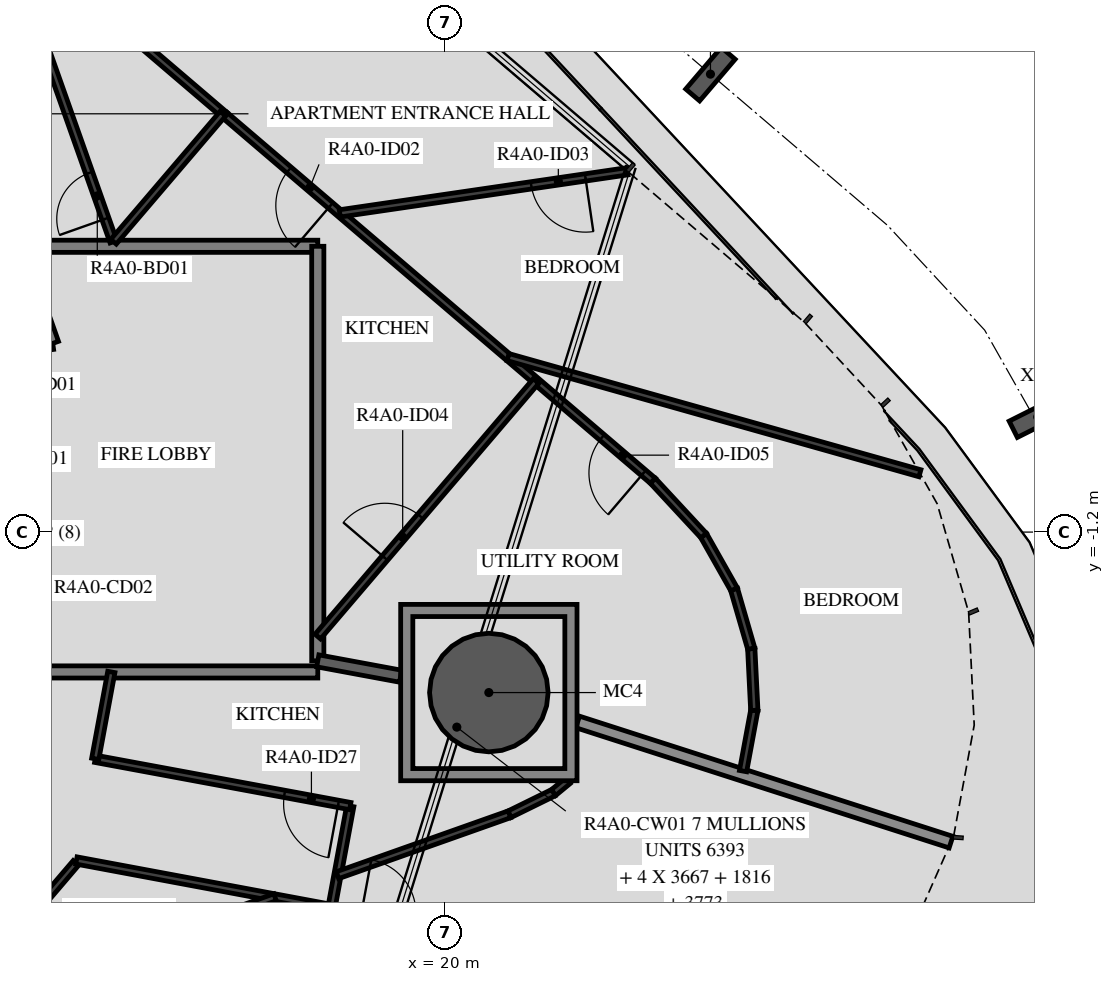
"""IFC4 building model, lengths in metres.
Left out: names, types, materials, properties, quantities, classifications, styles, units other than length and angle.
Written with IfcOpenShell. Run it as: python <this file> out.ifc"""

import sys

from ifc_helpers import new_model, si_unit, direction, frame, frame_2d, origin, origin_2d, place, context, subcontext, project, spatial, polyline, rectangle, hollow_circle, i_section, outline, extrude, element, fill, save


model = new_model("IFC4")
c1 = context("Model", 3, precision=1e-05, world=origin(), true_north=direction((0.0, 1.0)))
c2 = subcontext(c1, "Body", "Model", "MODEL_VIEW")
j1 = project(units=[si_unit("LENGTHUNIT", "METRE"), si_unit("PLANEANGLEUNIT", "RADIAN")], contexts=[c1])
p1 = place(None, origin())
s1 = spatial("IfcSite", under=j1, at=p1, CompositionType="ELEMENT")
p2 = place(p1, origin())
s2 = spatial("IfcBuilding", under=s1, at=p2, CompositionType="ELEMENT")
p3 = place(p2, frame((0.0, 0.0, 151.7)))
s3 = spatial("IfcBuildingStorey", under=s2, at=p3, CompositionType="ELEMENT", Elevation=151.7)
p4 = place(p3, frame((20.713, -3.839, -0.45), z_axis=(0.0, 0.0, 1.0), x_axis=(1.0, 0.0, 0.0)))
e1 = element("IfcColumn", 1, at=p4, inside=s3, PredefinedType="COLUMN", context=c2, shape_type="SweptSolid", body=[
    extrude(hollow_circle(Radius=0.975, WallThickness=0.045, at=origin_2d()), origin(), (0.0, 0.0, 1.0), 3.57),
])
for number, where, z_axis, x_axis in (
    (2, (29.74, 0.692, -0.45), (0.0, 0.0, 1.0), (0.449, -0.894, 0.0)),
    (3, (24.358, 6.331, -0.45), (0.0, 0.0, 1.0), (0.76, -0.649, 0.0)),
):
    element("IfcColumn", number, at=place(p3, frame(where, z_axis=z_axis, x_axis=x_axis)), inside=s3, PredefinedType="COLUMN", context=c2, shape_type="SweptSolid", body=[
        extrude(i_section(OverallWidth=0.3, OverallDepth=0.9, WebThickness=0.019, FlangeThickness=0.035, FilletRadius=0.03, at=origin_2d()), origin(), (0.0, 0.0, 1.0), 3.57),
    ])
p5 = place(p3, frame((11.87, 1.668, 0.0), z_axis=(0.0, 0.0, 1.0), x_axis=(0.990270910415, 0.139152879904, 0.0)))
e4 = element("IfcWall", 4, at=p5, inside=s3, PredefinedType="STANDARD", context=c2, shape_type="SweptSolid", body=[
    extrude(rectangle(XDim=1.688, YDim=0.2, at=frame_2d((0.844, 0.0))), origin(), (0.0, 0.0, 1.0), 3.12),
])
p6 = place(p5, frame((0.11, 0.0, 0.0)))
e5 = element("IfcOpeningElement", 5, at=p6, cuts=e4, PredefinedType="OPENING", context=c2, shape_type="SweptSolid", body=[
    extrude(rectangle(XDim=1.2, YDim=2.1, at=frame_2d((0.6, 1.05))), frame((0.0, 0.11, 0.0), z_axis=(0.0, -1.0, 0.0), x_axis=(1.0, 0.0, 0.0)), (0.0, 0.0, 1.0), 0.22),
])
p7 = place(p3, frame((13.542, 1.903, 0.0), z_axis=(0.0, 0.0, 1.0), x_axis=(-0.333808508206, 0.942640907159, 0.0)))
e6 = element("IfcWall", 6, at=p7, inside=s3, PredefinedType="STANDARD", context=c2, shape_type="SweptSolid", body=[
    extrude(rectangle(XDim=6.317, YDim=0.2, at=frame_2d((3.158, 0.0))), origin(), (0.0, 0.0, 1.0), 3.12),
])
p8 = place(p3, frame((17.9, 3.5, 0.0), z_axis=(0.0, 0.0, 1.0), x_axis=(-1.0, 0.0, 0.0)))
e7 = element("IfcWall", 7, at=p8, inside=s3, PredefinedType="STANDARD", context=c2, shape_type="SweptSolid", body=[
    extrude(rectangle(XDim=4.924, YDim=0.2, at=frame_2d((2.462, 0.0))), origin(), (0.0, 0.0, 1.0), 3.12),
])
p9 = place(p3, frame((17.9, -3.318, 0.0), z_axis=(0.0, 0.0, 1.0), x_axis=(0.0, 1.0, 0.0)))
e8 = element("IfcWall", 8, at=p9, inside=s3, PredefinedType="STANDARD", context=c2, shape_type="SweptSolid", body=[
    extrude(rectangle(XDim=6.818, YDim=0.2, at=frame_2d((3.409, 0.0))), origin(), (0.0, 0.0, 1.0), 3.12),
])
p10 = place(p3, frame((12.979, -3.5, 0.0), z_axis=(0.0, 0.0, 1.0), x_axis=(1.0, 0.0, 0.0)))
e9 = element("IfcWall", 9, at=p10, inside=s3, PredefinedType="STANDARD", context=c2, shape_type="SweptSolid", body=[
    extrude(rectangle(XDim=4.92, YDim=0.2, at=frame_2d((2.46, 0.0))), origin(), (0.0, 0.0, 1.0), 3.12),
])
p11 = place(p3, frame((22.173, -4.322, 0.0), z_axis=(0.0, 0.0, 1.0), x_axis=(0.951906405572, -0.306388960362, 0.0)))
e10 = element("IfcWall", 10, at=p11, inside=s3, PredefinedType="STANDARD", context=c2, shape_type="SweptSolid", body=[
    extrude(rectangle(XDim=6.45, YDim=0.2, at=frame_2d((3.225, 0.0))), origin(), (0.0, 0.0, 1.0), 2.73),
])
p12 = place(p3, frame((17.9, -3.318, 0.0), z_axis=(0.0, 0.0, 1.0), x_axis=(0.983252800712, -0.182246892682, 0.0)))
e11 = element("IfcWall", 11, at=p12, inside=s3, PredefinedType="STANDARD", context=c2, shape_type="SweptSolid", body=[
    extrude(rectangle(XDim=1.386, YDim=0.2, at=frame_2d((0.693, 0.0))), origin(), (0.0, 0.0, 1.0), 3.12),
])
p13 = place(p3, frame((14.541, 3.575, 0.0), z_axis=(0.0, 0.0, 1.0), x_axis=(-0.333799280318, 0.942644174893, 0.0)))
e12 = element("IfcWall", 12, at=p13, inside=s3, PredefinedType="PARTITIONING", context=c2, shape_type="SweptSolid", body=[
    extrude(rectangle(XDim=5.477, YDim=0.12, at=frame_2d((2.738, 0.0))), origin(), (0.0, 0.0, 1.0), 3.12),
])
p14 = place(p13, frame((0.4, 0.0, 0.0)))
e13 = element("IfcOpeningElement", 13, at=p14, cuts=e12, PredefinedType="OPENING", context=c2, shape_type="SweptSolid", body=[
    extrude(rectangle(XDim=0.8, YDim=2.1, at=frame_2d((0.4, 1.05))), frame((0.0, 0.07, 0.0), z_axis=(0.0, -1.0, 0.0), x_axis=(1.0, 0.0, 0.0)), (0.0, 0.0, 1.0), 0.14),
])
p15 = place(p3, frame((12.734, 8.762, 0.0), z_axis=(0.0, 0.0, 1.0), x_axis=(0.760390484255, -0.649466174219, 0.0)))
e14 = element("IfcWall", 14, at=p15, inside=s3, PredefinedType="PARTITIONING", context=c2, shape_type="SweptSolid", body=[
    extrude(rectangle(XDim=4.783, YDim=0.12, at=frame_2d((2.391, 0.0))), origin(), (0.0, 0.0, 1.0), 3.12),
])
p16 = place(p3, frame((23.411, -0.357, 0.0), z_axis=(0.0, 0.0, 1.0), x_axis=(-0.76041871148, 0.649433124525, 0.0)))
e15 = element("IfcWall", 15, at=p16, inside=s3, PredefinedType="PARTITIONING", context=c2, shape_type="SweptSolid", body=[
    extrude(rectangle(XDim=9.259, YDim=0.12, at=frame_2d((4.629, 0.0))), origin(), (0.0, 0.0, 1.0), 3.12),
])
p17 = place(p16, frame((6.972, 0.0, 0.0)))
e16 = element("IfcOpeningElement", 16, at=p17, cuts=e15, PredefinedType="OPENING", context=c2, shape_type="SweptSolid", body=[
    extrude(rectangle(XDim=0.9, YDim=2.1, at=frame_2d((0.45, 1.05))), frame((0.0, 0.07, 0.0), z_axis=(0.0, -1.0, 0.0), x_axis=(1.0, 0.0, 0.0)), (0.0, 0.0, 1.0), 0.14),
])
p18 = place(p16, frame((0.2, 0.0, 0.0)))
e17 = element("IfcOpeningElement", 17, at=p18, cuts=e15, PredefinedType="OPENING", context=c2, shape_type="SweptSolid", body=[
    extrude(rectangle(XDim=0.9, YDim=2.1, at=frame_2d((0.45, 1.05))), frame((0.0, 0.07, 0.0), z_axis=(0.0, -1.0, 0.0), x_axis=(1.0, 0.0, 0.0)), (0.0, 0.0, 1.0), 0.14),
])
p19 = place(p3, frame((16.341, 5.682, 0.0), z_axis=(0.0, 0.0, 1.0), x_axis=(-0.64946993237, -0.76038727432, 0.0)))
e18 = element("IfcWall", 18, at=p19, inside=s3, PredefinedType="PARTITIONING", context=c2, shape_type="SweptSolid", body=[
    extrude(rectangle(XDim=2.771, YDim=0.12, at=frame_2d((1.386, 0.0))), origin(), (0.0, 0.0, 1.0), 3.12),
])
p20 = place(p3, frame((17.9, -2.918, 0.0), z_axis=(0.0, 0.0, 1.0), x_axis=(0.649469887983, 0.760387312232, 0.0)))
e19 = element("IfcWall", 19, at=p20, inside=s3, PredefinedType="PARTITIONING", context=c2, shape_type="SweptSolid", body=[
    extrude(rectangle(XDim=5.527, YDim=0.12, at=frame_2d((2.763, 0.0))), origin(), (0.0, 0.0, 1.0), 3.12),
])
p21 = place(p20, frame((1.7, 0.0, 0.0)))
e20 = element("IfcOpeningElement", 20, at=p21, cuts=e19, PredefinedType="OPENING", context=c2, shape_type="SweptSolid", body=[
    extrude(rectangle(XDim=0.9, YDim=2.1, at=frame_2d((0.45, 1.05))), frame((0.0, 0.07, 0.0), z_axis=(0.0, -1.0, 0.0), x_axis=(1.0, 0.0, 0.0)), (0.0, 0.0, 1.0), 0.14),
])
p22 = place(p3, frame((22.994, 4.734, 0.0), z_axis=(0.0, 0.0, 1.0), x_axis=(-0.989449286977, -0.144879634529, 0.0)))
e21 = element("IfcWall", 21, at=p22, inside=s3, PredefinedType="PARTITIONING", context=c2, shape_type="SweptSolid", body=[
    extrude(rectangle(XDim=4.782, YDim=0.12, at=frame_2d((2.391, 0.0))), origin(), (0.0, 0.0, 1.0), 3.12),
])
p23 = place(p22, frame((0.7, 0.0, 0.0)))
e22 = element("IfcOpeningElement", 22, at=p23, cuts=e21, PredefinedType="OPENING", context=c2, shape_type="SweptSolid", body=[
    extrude(rectangle(XDim=0.9, YDim=2.1, at=frame_2d((0.45, 1.05))), frame((0.0, 0.07, 0.0), z_axis=(0.0, -1.0, 0.0), x_axis=(1.0, 0.0, 0.0)), (0.0, 0.0, 1.0), 0.14),
])
p24 = place(p3, frame((21.029, 1.677, 0.0), z_axis=(0.0, 0.0, 1.0), x_axis=(0.962458274539, -0.271429677396, 0.0)))
e23 = element("IfcWall", 23, at=p24, inside=s3, PredefinedType="PARTITIONING", context=c2, shape_type="SweptSolid", body=[
    extrude(rectangle(XDim=7.037, YDim=0.12, at=frame_2d((3.519, 0.0))), origin(), (0.0, 0.0, 1.0), 3.12),
])
for number, where, z_axis, x_axis in (
    (24, (24.894, -5.131, 0.0), (0.0, 0.0, 1.0), (0.182, 0.983, 0.0)),
    (25, (25.079, -4.132, 0.0), (0.0, 0.0, 1.0), (-0.049, 0.999, 0.0)),
):
    element("IfcWall", number, at=place(p3, frame(where, z_axis=z_axis, x_axis=x_axis)), inside=s3, PredefinedType="PARTITIONING", context=c2, shape_type="SweptSolid", body=[
        extrude(rectangle(XDim=1.016, YDim=0.12, at=frame_2d((0.508, 0.0))), origin(), (0.0, 0.0, 1.0), 3.12),
    ])
for number, where, z_axis, x_axis in (
    (26, (25.029, -3.117, 0.0), (0.0, 0.0, 1.0), (-0.279, 0.96, 0.0)),
    (27, (24.746, -2.141, 0.0), (0.0, 0.0, 1.0), (-0.492, 0.87, 0.0)),
):
    element("IfcWall", number, at=place(p3, frame(where, z_axis=z_axis, x_axis=x_axis)), inside=s3, PredefinedType="PARTITIONING", context=c2, shape_type="SweptSolid", body=[
        extrude(rectangle(XDim=1.016, YDim=0.12, at=frame_2d((0.508, 0.0))), origin(), (0.0, 0.0, 1.0), 3.12),
    ])
p25 = place(p3, frame((24.246, -1.257, 0.0), z_axis=(0.0, 0.0, 1.0), x_axis=(-0.679840361176, 0.733360132074, 0.0)))
e28 = element("IfcWall", 28, at=p25, inside=s3, PredefinedType="PARTITIONING", context=c2, shape_type="SweptSolid", body=[
    extrude(rectangle(XDim=1.227, YDim=0.12, at=frame_2d((0.614, 0.0))), origin(), (0.0, 0.0, 1.0), 3.12),
])
p26 = place(p3, frame((8.737, -12.713, 0.0), z_axis=(0.0, 0.0, 1.0), x_axis=(0.649430604754, 0.760420863476, 0.0)))
e29 = element("IfcWall", 29, at=p26, inside=s3, PredefinedType="PARTITIONING", context=c2, shape_type="SweptSolid", body=[
    extrude(rectangle(XDim=7.985, YDim=0.12, at=frame_2d((3.992, 0.0))), origin(), (0.0, 0.0, 1.0), 3.12),
])
p27 = place(p26, frame((0.2, 0.0, 0.0)))
e30 = element("IfcOpeningElement", 30, at=p27, cuts=e29, PredefinedType="OPENING", context=c2, shape_type="SweptSolid", body=[
    extrude(rectangle(XDim=0.9, YDim=2.1, at=frame_2d((0.45, 1.05))), frame((0.0, 0.07, 0.0), z_axis=(0.0, -1.0, 0.0), x_axis=(1.0, 0.0, 0.0)), (0.0, 0.0, 1.0), 0.14),
])
p28 = place(p26, frame((6.234, 0.0, 0.0)))
e31 = element("IfcOpeningElement", 31, at=p28, cuts=e29, PredefinedType="OPENING", context=c2, shape_type="SweptSolid", body=[
    extrude(rectangle(XDim=0.8, YDim=2.1, at=frame_2d((0.4, 1.05))), frame((0.0, 0.07, 0.0), z_axis=(0.0, -1.0, 0.0), x_axis=(1.0, 0.0, 0.0)), (0.0, 0.0, 1.0), 0.14),
])
p29 = place(p3, frame((13.93, -6.6, 0.0), z_axis=(0.0, 0.0, 1.0), x_axis=(0.983034896283, -0.183418626887, 0.0)))
e32 = element("IfcWall", 32, at=p29, inside=s3, PredefinedType="PARTITIONING", context=c2, shape_type="SweptSolid", body=[
    extrude(rectangle(XDim=13.066, YDim=0.12, at=frame_2d((6.533, 0.0))), origin(), (0.0, 0.0, 1.0), 3.12),
])
p30 = place(p29, frame((4.766, 0.0, 0.0)))
e33 = element("IfcOpeningElement", 33, at=p30, cuts=e32, PredefinedType="OPENING", context=c2, shape_type="SweptSolid", body=[
    extrude(rectangle(XDim=0.9, YDim=2.1, at=frame_2d((0.45, 1.05))), frame((0.0, 0.07, 0.0), z_axis=(0.0, -1.0, 0.0), x_axis=(1.0, 0.0, 0.0)), (0.0, 0.0, 1.0), 0.14),
])
p31 = place(p3, frame((18.125, -7.377, 0.0), z_axis=(0.0, 0.0, 1.0), x_axis=(0.182233242958, 0.983255330604, 0.0)))
e34 = element("IfcWall", 34, at=p31, inside=s3, PredefinedType="PARTITIONING", context=c2, shape_type="SweptSolid", body=[
    extrude(rectangle(XDim=1.7, YDim=0.12, at=frame_2d((0.85, 0.0))), origin(), (0.0, 0.0, 1.0), 3.12),
])
p32 = place(p3, frame((18.435, -5.706, 0.0), z_axis=(0.0, 0.0, 1.0), x_axis=(-0.983256187302, 0.18222862051, 0.0)))
e35 = element("IfcWall", 35, at=p32, inside=s3, PredefinedType="PARTITIONING", context=c2, shape_type="SweptSolid", body=[
    extrude(rectangle(XDim=4.266, YDim=0.12, at=frame_2d((2.133, 0.0))), origin(), (0.0, 0.0, 1.0), 3.12),
])
p33 = place(p32, frame((0.2, 0.0, 0.0)))
e36 = element("IfcOpeningElement", 36, at=p33, cuts=e35, PredefinedType="OPENING", context=c2, shape_type="SweptSolid", body=[
    extrude(rectangle(XDim=0.9, YDim=2.1, at=frame_2d((0.45, 1.05))), frame((0.0, 0.07, 0.0), z_axis=(0.0, -1.0, 0.0), x_axis=(1.0, 0.0, 0.0)), (0.0, 0.0, 1.0), 0.14),
])
p34 = place(p3, frame((14.24, -4.928, 0.0), z_axis=(0.0, 0.0, 1.0), x_axis=(0.182329957282, 0.983237400976, 0.0)))
e37 = element("IfcWall", 37, at=p34, inside=s3, PredefinedType="PARTITIONING", context=c2, shape_type="SweptSolid", body=[
    extrude(rectangle(XDim=1.453, YDim=0.12, at=frame_2d((0.727, 0.0))), origin(), (0.0, 0.0, 1.0), 3.12),
])
p35 = place(p3, frame((17.198, -7.206, 0.0), z_axis=(0.0, 0.0, 1.0), x_axis=(-0.942639551003, -0.333812337826, 0.0)))
e38 = element("IfcWall", 38, at=p35, inside=s3, PredefinedType="PARTITIONING", context=c2, shape_type="SweptSolid", body=[
    extrude(rectangle(XDim=5.713, YDim=0.12, at=frame_2d((2.857, 0.0))), origin(), (0.0, 0.0, 1.0), 3.12),
])
p36 = place(p3, frame((22.013, -5.289, 0.0), z_axis=(0.0, 0.0, 1.0), x_axis=(-0.771907381926, -0.635735002755, 0.0)))
e39 = element("IfcWall", 39, at=p36, inside=s3, PredefinedType="PARTITIONING", context=c2, shape_type="SweptSolid", body=[
    extrude(rectangle(XDim=0.308, YDim=0.12, at=frame_2d((0.154, 0.0))), origin(), (0.0, 0.0, 1.0), 3.12),
])
p37 = place(p3, frame((21.775, -5.485, 0.0), z_axis=(0.0, 0.0, 1.0), x_axis=(-0.897493373385, -0.441027940986, 0.0)))
e40 = element("IfcWall", 40, at=p37, inside=s3, PredefinedType="PARTITIONING", context=c2, shape_type="SweptSolid", body=[
    extrude(rectangle(XDim=0.807, YDim=0.12, at=frame_2d((0.403, 0.0))), origin(), (0.0, 0.0, 1.0), 3.12),
])
p38 = place(p3, frame((21.052, -5.841, 0.0), z_axis=(0.0, 0.0, 1.0), x_axis=(-0.94262615799, -0.33385015542, 0.0)))
e41 = element("IfcWall", 41, at=p38, inside=s3, PredefinedType="PARTITIONING", context=c2, shape_type="SweptSolid", body=[
    extrude(rectangle(XDim=3.0, YDim=0.12, at=frame_2d((1.5, 0.0))), origin(), (0.0, 0.0, 1.0), 3.12),
])
p39 = place(p3, origin())
e42 = element("IfcWall", 42, at=p39, inside=s3, PredefinedType="STANDARD", context=c2, shape_type="SweptSolid", body=[
    extrude(outline(polyline([(22.163, -2.389), (22.163, -5.289), (19.263, -5.289), (19.263, -2.389), (22.163, -2.389)]), holes=[polyline([(19.463, -5.089), (21.963, -5.089), (21.963, -2.589), (19.463, -2.589), (19.463, -5.089)])]), origin(), (0.0, 0.0, 1.0), 3.12),
])
p40 = place(p14, origin())
e43 = element("IfcDoor", 43, at=p40, inside=s3, OperationType="SINGLE_SWING_LEFT", PredefinedType="DOOR", context=c2, shape_type="SweptSolid", body=[
    extrude(rectangle(XDim=0.8, YDim=2.1, at=frame_2d((0.4, 1.05))), frame((0.0, 0.025, 0.0), z_axis=(0.0, -1.0, 0.0), x_axis=(1.0, 0.0, 0.0)), (0.0, 0.0, 1.0), 0.05),
])
fill(e13, e43)
p41 = place(p17, origin())
e44 = element("IfcDoor", 44, at=p41, inside=s3, OperationType="SINGLE_SWING_RIGHT", PredefinedType="DOOR", context=c2, shape_type="SweptSolid", body=[
    extrude(rectangle(XDim=0.9, YDim=2.1, at=frame_2d((0.45, 1.05))), frame((0.0, 0.025, 0.0), z_axis=(0.0, -1.0, 0.0), x_axis=(1.0, 0.0, 0.0)), (0.0, 0.0, 1.0), 0.05),
])
fill(e16, e44)
p42 = place(p23, origin())
e45 = element("IfcDoor", 45, at=p42, inside=s3, OperationType="SINGLE_SWING_LEFT", PredefinedType="DOOR", context=c2, shape_type="SweptSolid", body=[
    extrude(rectangle(XDim=0.9, YDim=2.1, at=frame_2d((0.45, 1.05))), frame((0.0, 0.025, 0.0), z_axis=(0.0, -1.0, 0.0), x_axis=(1.0, 0.0, 0.0)), (0.0, 0.0, 1.0), 0.05),
])
fill(e22, e45)
p43 = place(p21, origin())
e46 = element("IfcDoor", 46, at=p43, inside=s3, OperationType="SINGLE_SWING_LEFT", PredefinedType="DOOR", context=c2, shape_type="SweptSolid", body=[
    extrude(rectangle(XDim=0.9, YDim=2.1, at=frame_2d((0.45, 1.05))), frame((0.0, 0.025, 0.0), z_axis=(0.0, -1.0, 0.0), x_axis=(1.0, 0.0, 0.0)), (0.0, 0.0, 1.0), 0.05),
])
fill(e20, e46)
p44 = place(p18, origin())
e47 = element("IfcDoor", 47, at=p44, inside=s3, OperationType="SINGLE_SWING_LEFT", PredefinedType="DOOR", context=c2, shape_type="SweptSolid", body=[
    extrude(rectangle(XDim=0.9, YDim=2.1, at=frame_2d((0.45, 1.05))), frame((0.0, 0.025, 0.0), z_axis=(0.0, -1.0, 0.0), x_axis=(1.0, 0.0, 0.0)), (0.0, 0.0, 1.0), 0.05),
])
fill(e17, e47)
p45 = place(p33, origin())
e48 = element("IfcDoor", 48, at=p45, inside=s3, OperationType="SINGLE_SWING_LEFT", PredefinedType="DOOR", context=c2, shape_type="SweptSolid", body=[
    extrude(rectangle(XDim=0.9, YDim=2.1, at=frame_2d((0.45, 1.05))), frame((0.0, 0.025, 0.0), z_axis=(0.0, -1.0, 0.0), x_axis=(1.0, 0.0, 0.0)), (0.0, 0.0, 1.0), 0.05),
])
fill(e36, e48)
save(model, sys.argv[1])
